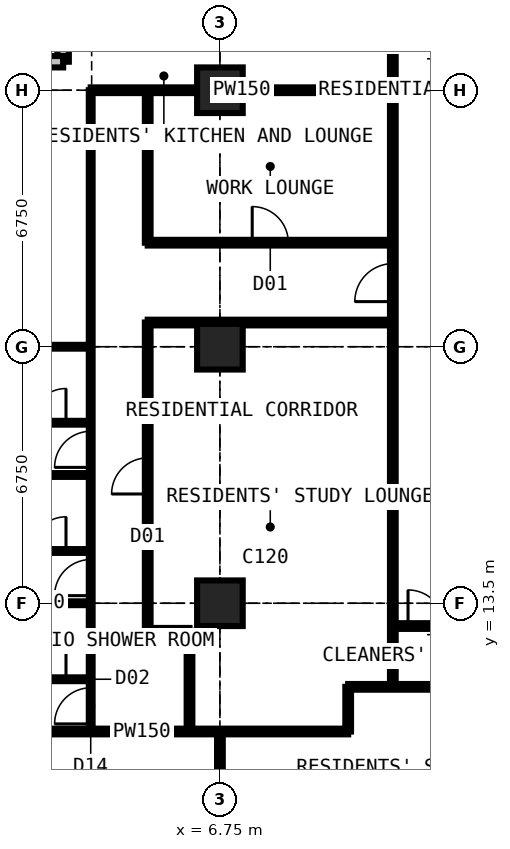
"""IFC4 building model, lengths in metres.
Left out: names, types, materials, properties, quantities, classifications, styles, units other than length and angle.
Written with IfcOpenShell. Run it as: python <this file> out.ifc"""

import sys

from ifc_helpers import new_model, si_unit, direction, frame, frame_2d, origin, origin_2d, place, context, subcontext, project, spatial, rectangle, extrude, element, fill, save


model = new_model("IFC4")
c1 = context("Model", 3, precision=1e-05, world=origin(), true_north=direction((0.0, 1.0)))
c2 = subcontext(c1, "Body", "Model", "MODEL_VIEW")
j1 = project(units=[si_unit("LENGTHUNIT", "METRE"), si_unit("PLANEANGLEUNIT", "RADIAN")], contexts=[c1])
p1 = place(None, origin())
s1 = spatial("IfcSite", under=j1, at=p1, CompositionType="ELEMENT")
p2 = place(p1, origin())
s2 = spatial("IfcBuilding", under=s1, at=p2, CompositionType="ELEMENT")
p3 = place(p2, frame((0.0, 0.0, 192.6)))
s3 = spatial("IfcBuildingStorey", under=s2, at=p3, CompositionType="ELEMENT", Elevation=192.6)
for number, where, z_axis, x_axis in (
    (1, (6.75, 13.5, 0.0), (0.0, 0.0, 1.0), (1.0, 0.0, 0.0)),
    (2, (6.75, 20.25, 0.0), (0.0, 0.0, 1.0), (1.0, 0.0, 0.0)),
    (3, (6.75, 27.0, 0.0), (0.0, 0.0, 1.0), (1.0, 0.0, 0.0)),
):
    element("IfcColumn", number, at=place(p3, frame(where, z_axis=z_axis, x_axis=x_axis)), inside=s3, PredefinedType="COLUMN", context=c2, shape_type="SweptSolid", body=[
        extrude(rectangle(XDim=1.2, YDim=1.2, at=origin_2d()), origin(), (0.0, 0.0, 1.0), 3.6),
    ])
p4 = place(p3, frame((2.625, 31.125, 0.0), z_axis=(0.0, 0.0, 1.0), x_axis=(0.0, -1.0, 0.0)))
e4 = element("IfcWall", 4, at=p4, inside=s3, PredefinedType="SOLIDWALL", context=c2, shape_type="SweptSolid", body=[
    extrude(rectangle(XDim=3.375, YDim=0.3, at=frame_2d((1.688, 0.0))), origin(), (0.0, 0.0, 1.0), 3.375),
])
p5 = place(p4, frame((0.788, 0.0, 0.6)))
e5 = element("IfcOpeningElement", 5, at=p5, cuts=e4, PredefinedType="OPENING", context=c2, shape_type="SweptSolid", body=[
    extrude(rectangle(XDim=1.8, YDim=2.1, at=frame_2d((0.9, 1.05))), frame((0.0, 0.16, 0.0), z_axis=(0.0, -1.0, 0.0), x_axis=(1.0, 0.0, 0.0)), (0.0, 0.0, 1.0), 0.32),
])
p6 = place(p3, frame((2.625, 27.75, 0.0), z_axis=(0.0, 0.0, 1.0), x_axis=(-1.0, 0.0, 0.0)))
e6 = element("IfcWall", 6, at=p6, inside=s3, PredefinedType="SOLIDWALL", context=c2, shape_type="SweptSolid", body=[
    extrude(rectangle(XDim=3.375, YDim=0.3, at=frame_2d((1.688, 0.0))), origin(), (0.0, 0.0, 1.0), 3.375),
])
p7 = place(p6, frame((0.788, 0.0, 0.6)))
e7 = element("IfcOpeningElement", 7, at=p7, cuts=e6, PredefinedType="OPENING", context=c2, shape_type="SweptSolid", body=[
    extrude(rectangle(XDim=1.8, YDim=2.1, at=frame_2d((0.9, 1.05))), frame((0.0, 0.16, 0.0), z_axis=(0.0, -1.0, 0.0), x_axis=(1.0, 0.0, 0.0)), (0.0, 0.0, 1.0), 0.32),
])
p8 = place(p3, frame((-0.734, 10.125, 0.0), z_axis=(0.0, 0.0, 1.0), x_axis=(1.0, 0.0, 0.0)))
e8 = element("IfcWall", 8, at=p8, inside=s3, PredefinedType="PARTITIONING", context=c2, shape_type="SweptSolid", body=[
    extrude(rectangle(XDim=10.859, YDim=0.15, at=frame_2d((5.429, 0.0))), origin(), (0.0, 0.0, 1.0), 3.375),
])
p9 = place(p3, frame((-0.734, 13.5, 0.0), z_axis=(0.0, 0.0, 1.0), x_axis=(1.0, 0.0, 0.0)))
e9 = element("IfcWall", 9, at=p9, inside=s3, PredefinedType="PARTITIONING", context=c2, shape_type="SweptSolid", body=[
    extrude(rectangle(XDim=4.084, YDim=0.1, at=frame_2d((2.042, 0.0))), origin(), (0.0, 0.0, 1.0), 2.877),
])
p10 = place(p3, frame((-0.734, 16.875, 0.0), z_axis=(0.0, 0.0, 1.0), x_axis=(1.0, 0.0, 0.0)))
e10 = element("IfcWall", 10, at=p10, inside=s3, PredefinedType="PARTITIONING", context=c2, shape_type="SweptSolid", body=[
    extrude(rectangle(XDim=4.084, YDim=0.1, at=frame_2d((2.042, 0.0))), origin(), (0.0, 0.0, 1.0), 3.375),
])
p11 = place(p3, frame((-0.734, 20.25, 0.0), z_axis=(0.0, 0.0, 1.0), x_axis=(1.0, 0.0, 0.0)))
e11 = element("IfcWall", 11, at=p11, inside=s3, PredefinedType="PARTITIONING", context=c2, shape_type="SweptSolid", body=[
    extrude(rectangle(XDim=4.084, YDim=0.1, at=frame_2d((2.042, 0.0))), origin(), (0.0, 0.0, 1.0), 2.877),
])
p12 = place(p3, frame((1.15, 11.5, 0.0), z_axis=(0.0, 0.0, 1.0), x_axis=(1.0, 0.0, 0.0)))
e12 = element("IfcWall", 12, at=p12, inside=s3, PredefinedType="PARTITIONING", context=c2, shape_type="SweptSolid", body=[
    extrude(rectangle(XDim=2.2, YDim=0.1, at=frame_2d((1.1, 0.0))), origin(), (0.0, 0.0, 1.0), 3.375),
])
p13 = place(p12, frame((0.65, 0.0, 0.0)))
e13 = element("IfcOpeningElement", 13, at=p13, cuts=e12, PredefinedType="OPENING", context=c2, shape_type="SweptSolid", body=[
    extrude(rectangle(XDim=0.9, YDim=2.2, at=frame_2d((0.45, 1.1))), frame((0.0, 0.06, 0.0), z_axis=(0.0, -1.0, 0.0), x_axis=(1.0, 0.0, 0.0)), (0.0, 0.0, 1.0), 0.12),
])
p14 = place(p3, frame((1.15, 14.875, 0.0), z_axis=(0.0, 0.0, 1.0), x_axis=(1.0, 0.0, 0.0)))
e14 = element("IfcWall", 14, at=p14, inside=s3, PredefinedType="PARTITIONING", context=c2, shape_type="SweptSolid", body=[
    extrude(rectangle(XDim=2.2, YDim=0.1, at=frame_2d((1.1, 0.0))), origin(), (0.0, 0.0, 1.0), 3.375),
])
p15 = place(p14, frame((0.65, 0.0, 0.0)))
e15 = element("IfcOpeningElement", 15, at=p15, cuts=e14, PredefinedType="OPENING", context=c2, shape_type="SweptSolid", body=[
    extrude(rectangle(XDim=0.9, YDim=2.2, at=frame_2d((0.45, 1.1))), frame((0.0, 0.06, 0.0), z_axis=(0.0, -1.0, 0.0), x_axis=(1.0, 0.0, 0.0)), (0.0, 0.0, 1.0), 0.12),
])
p16 = place(p3, frame((1.15, 18.25, 0.0), z_axis=(0.0, 0.0, 1.0), x_axis=(1.0, 0.0, 0.0)))
e16 = element("IfcWall", 16, at=p16, inside=s3, PredefinedType="PARTITIONING", context=c2, shape_type="SweptSolid", body=[
    extrude(rectangle(XDim=2.2, YDim=0.1, at=frame_2d((1.1, 0.0))), origin(), (0.0, 0.0, 1.0), 3.375),
])
p17 = place(p16, frame((0.65, 0.0, 0.0)))
e17 = element("IfcOpeningElement", 17, at=p17, cuts=e16, PredefinedType="OPENING", context=c2, shape_type="SweptSolid", body=[
    extrude(rectangle(XDim=0.9, YDim=2.2, at=frame_2d((0.45, 1.1))), frame((0.0, 0.06, 0.0), z_axis=(0.0, -1.0, 0.0), x_axis=(1.0, 0.0, 0.0)), (0.0, 0.0, 1.0), 0.12),
])
p18 = place(p3, frame((3.35, 10.125, 0.0), z_axis=(0.0, 0.0, 1.0), x_axis=(0.0, 1.0, 0.0)))
e18 = element("IfcWall", 18, at=p18, inside=s3, PredefinedType="PARTITIONING", context=c2, shape_type="SweptSolid", body=[
    extrude(rectangle(XDim=16.875, YDim=0.1, at=frame_2d((8.438, 0.0))), origin(), (0.0, 0.0, 1.0), 3.375),
])
p19 = place(p18, frame((0.2, 0.0, 0.0)))
e19 = element("IfcOpeningElement", 19, at=p19, cuts=e18, PredefinedType="OPENING", context=c2, shape_type="SweptSolid", body=[
    extrude(rectangle(XDim=0.95, YDim=2.2, at=frame_2d((0.475, 1.1))), frame((0.0, 0.06, 0.0), z_axis=(0.0, -1.0, 0.0), x_axis=(1.0, 0.0, 0.0)), (0.0, 0.0, 1.0), 0.12),
])
p20 = place(p18, frame((3.575, 0.0, 0.0)))
e20 = element("IfcOpeningElement", 20, at=p20, cuts=e18, PredefinedType="OPENING", context=c2, shape_type="SweptSolid", body=[
    extrude(rectangle(XDim=0.95, YDim=2.2, at=frame_2d((0.475, 1.1))), frame((0.0, 0.06, 0.0), z_axis=(0.0, -1.0, 0.0), x_axis=(1.0, 0.0, 0.0)), (0.0, 0.0, 1.0), 0.12),
])
p21 = place(p18, frame((6.95, 0.0, 0.0)))
e21 = element("IfcOpeningElement", 21, at=p21, cuts=e18, PredefinedType="OPENING", context=c2, shape_type="SweptSolid", body=[
    extrude(rectangle(XDim=0.95, YDim=2.2, at=frame_2d((0.475, 1.1))), frame((0.0, 0.06, 0.0), z_axis=(0.0, -1.0, 0.0), x_axis=(1.0, 0.0, 0.0)), (0.0, 0.0, 1.0), 0.12),
])
p22 = place(p3, frame((3.35, 27.0, 0.0), z_axis=(0.0, 0.0, 1.0), x_axis=(1.0, 0.0, 0.0)))
e22 = element("IfcWall", 22, at=p22, inside=s3, PredefinedType="PARTITIONING", context=c2, shape_type="SweptSolid", body=[
    extrude(rectangle(XDim=7.95, YDim=0.15, at=frame_2d((3.975, 0.0))), origin(), (0.0, 0.0, 1.0), 2.806),
])
p23 = place(p3, frame((4.85, 12.775, 0.0), z_axis=(0.0, 0.0, 1.0), x_axis=(0.0, 1.0, 0.0)))
e23 = element("IfcWall", 23, at=p23, inside=s3, PredefinedType="PARTITIONING", context=c2, shape_type="SweptSolid", body=[
    extrude(rectangle(XDim=8.113, YDim=0.15, at=frame_2d((4.056, 0.0))), origin(), (0.0, 0.0, 1.0), 3.375),
])
p24 = place(p23, frame((3.6, 0.0, 0.0)))
e24 = element("IfcOpeningElement", 24, at=p24, cuts=e23, PredefinedType="OPENING", context=c2, shape_type="SweptSolid", body=[
    extrude(rectangle(XDim=0.95, YDim=2.2, at=frame_2d((0.475, 1.1))), frame((0.0, 0.085, 0.0), z_axis=(0.0, -1.0, 0.0), x_axis=(1.0, 0.0, 0.0)), (0.0, 0.0, 1.0), 0.17),
])
p25 = place(p3, frame((4.85, 12.775, 0.0), z_axis=(0.0, 0.0, 1.0), x_axis=(1.0, 0.0, 0.0)))
e25 = element("IfcWall", 25, at=p25, inside=s3, PredefinedType="PARTITIONING", context=c2, shape_type="SweptSolid", body=[
    extrude(rectangle(XDim=1.1, YDim=0.15, at=frame_2d((0.55, 0.0))), origin(), (0.0, 0.0, 1.0), 3.375),
])
p26 = place(p3, frame((4.85, 20.887, 0.0), z_axis=(0.0, 0.0, 1.0), x_axis=(1.0, 0.0, 0.0)))
e26 = element("IfcWall", 26, at=p26, inside=s3, PredefinedType="PARTITIONING", context=c2, shape_type="SweptSolid", body=[
    extrude(rectangle(XDim=6.45, YDim=0.15, at=frame_2d((3.225, 0.0))), origin(), (0.0, 0.0, 1.0), 3.375),
])
p27 = place(p3, frame((4.85, 22.988, 0.0), z_axis=(0.0, 0.0, 1.0), x_axis=(0.0, 1.0, 0.0)))
e27 = element("IfcWall", 27, at=p27, inside=s3, PredefinedType="PARTITIONING", context=c2, shape_type="SweptSolid", body=[
    extrude(rectangle(XDim=4.012, YDim=0.15, at=frame_2d((2.006, 0.0))), origin(), (0.0, 0.0, 1.0), 3.375),
])
p28 = place(p3, frame((4.85, 22.988, 0.0), z_axis=(0.0, 0.0, 1.0), x_axis=(1.0, 0.0, 0.0)))
e28 = element("IfcWall", 28, at=p28, inside=s3, PredefinedType="PARTITIONING", context=c2, shape_type="SweptSolid", body=[
    extrude(rectangle(XDim=6.45, YDim=0.15, at=frame_2d((3.225, 0.0))), origin(), (0.0, 0.0, 1.0), 3.375),
])
p29 = place(p28, frame((2.75, 0.0, 0.0)))
e29 = element("IfcOpeningElement", 29, at=p29, cuts=e28, PredefinedType="OPENING", context=c2, shape_type="SweptSolid", body=[
    extrude(rectangle(XDim=0.95, YDim=2.2, at=frame_2d((0.475, 1.1))), frame((0.0, 0.085, 0.0), z_axis=(0.0, -1.0, 0.0), x_axis=(1.0, 0.0, 0.0)), (0.0, 0.0, 1.0), 0.17),
])
p30 = place(p3, frame((5.95, 10.125, 0.0), z_axis=(0.0, 0.0, 1.0), x_axis=(0.0, 1.0, 0.0)))
e30 = element("IfcWall", 30, at=p30, inside=s3, PredefinedType="PARTITIONING", context=c2, shape_type="SweptSolid", body=[
    extrude(rectangle(XDim=2.65, YDim=0.15, at=frame_2d((1.325, 0.0))), origin(), (0.0, 0.0, 1.0), 3.375),
])
p31 = place(p3, frame((6.75, 3.35, 0.0), z_axis=(0.0, 0.0, 1.0), x_axis=(0.0, 1.0, 0.0)))
e31 = element("IfcWall", 31, at=p31, inside=s3, PredefinedType="PARTITIONING", context=c2, shape_type="SweptSolid", body=[
    extrude(rectangle(XDim=6.775, YDim=0.15, at=frame_2d((3.387, 0.0))), origin(), (0.0, 0.0, 1.0), 2.877),
])
p32 = place(p3, frame((10.125, 10.125, 0.0), z_axis=(0.0, 0.0, 1.0), x_axis=(0.0, 1.0, 0.0)))
e32 = element("IfcWall", 32, at=p32, inside=s3, PredefinedType="PARTITIONING", context=c2, shape_type="SweptSolid", body=[
    extrude(rectangle(XDim=1.175, YDim=0.15, at=frame_2d((0.587, 0.0))), origin(), (0.0, 0.0, 1.0), 3.375),
])
p33 = place(p3, frame((10.125, 11.3, 0.0), z_axis=(0.0, 0.0, 1.0), x_axis=(1.0, 0.0, 0.0)))
e33 = element("IfcWall", 33, at=p33, inside=s3, PredefinedType="PARTITIONING", context=c2, shape_type="SweptSolid", body=[
    extrude(rectangle(XDim=20.25, YDim=0.15, at=frame_2d((10.125, 0.0))), origin(), (0.0, 0.0, 1.0), 3.375),
])
p34 = place(p33, frame((8.375, 0.0, 0.0)))
e34 = element("IfcOpeningElement", 34, at=p34, cuts=e33, PredefinedType="OPENING", context=c2, shape_type="SweptSolid", body=[
    extrude(rectangle(XDim=1.0, YDim=2.2, at=frame_2d((0.5, 1.1))), frame((0.0, 0.085, 0.0), z_axis=(0.0, -1.0, 0.0), x_axis=(1.0, 0.0, 0.0)), (0.0, 0.0, 1.0), 0.17),
])
p35 = place(p33, frame((10.975, 0.0, 0.0)))
e35 = element("IfcOpeningElement", 35, at=p35, cuts=e33, PredefinedType="OPENING", context=c2, shape_type="SweptSolid", body=[
    extrude(rectangle(XDim=1.0, YDim=2.2, at=frame_2d((0.5, 1.1))), frame((0.0, 0.085, 0.0), z_axis=(0.0, -1.0, 0.0), x_axis=(1.0, 0.0, 0.0)), (0.0, 0.0, 1.0), 0.17),
])
p36 = place(p33, frame((4.875, 0.0, 0.0)))
e36 = element("IfcOpeningElement", 36, at=p36, cuts=e33, PredefinedType="OPENING", context=c2, shape_type="SweptSolid", body=[
    extrude(rectangle(XDim=0.95, YDim=2.2, at=frame_2d((0.475, 1.1))), frame((0.0, 0.085, 0.0), z_axis=(0.0, -1.0, 0.0), x_axis=(1.0, 0.0, 0.0)), (0.0, 0.0, 1.0), 0.17),
])
p37 = place(p3, frame((11.3, 11.3, 0.0), z_axis=(0.0, 0.0, 1.0), x_axis=(0.0, 1.0, 0.0)))
e37 = element("IfcWall", 37, at=p37, inside=s3, PredefinedType="PARTITIONING", context=c2, shape_type="SweptSolid", body=[
    extrude(rectangle(XDim=19.3, YDim=0.15, at=frame_2d((9.65, 0.0))), origin(), (0.0, 0.0, 1.0), 3.375),
])
p38 = place(p37, frame((18.1, 0.0, 0.0)))
e38 = element("IfcOpeningElement", 38, at=p38, cuts=e37, PredefinedType="OPENING", context=c2, shape_type="SweptSolid", body=[
    extrude(rectangle(XDim=1.0, YDim=2.2, at=frame_2d((0.5, 1.1))), frame((0.0, 0.085, 0.0), z_axis=(0.0, -1.0, 0.0), x_axis=(1.0, 0.0, 0.0)), (0.0, 0.0, 1.0), 0.17),
])
p39 = place(p37, frame((10.137, 0.0, 0.0)))
e39 = element("IfcOpeningElement", 39, at=p39, cuts=e37, PredefinedType="OPENING", context=c2, shape_type="SweptSolid", body=[
    extrude(rectangle(XDim=1.0, YDim=2.2, at=frame_2d((0.5, 1.1))), frame((0.0, 0.085, 0.0), z_axis=(0.0, -1.0, 0.0), x_axis=(1.0, 0.0, 0.0)), (0.0, 0.0, 1.0), 0.17),
])
p40 = place(p3, frame((11.3, 12.9, 0.0), z_axis=(0.0, 0.0, 1.0), x_axis=(1.0, 0.0, 0.0)))
e40 = element("IfcWall", 40, at=p40, inside=s3, PredefinedType="PARTITIONING", context=c2, shape_type="SweptSolid", body=[
    extrude(rectangle(XDim=1.8, YDim=0.15, at=frame_2d((0.9, 0.0))), origin(), (0.0, 0.0, 1.0), 2.806),
])
p41 = place(p40, frame((0.4, 0.0, 0.0)))
e41 = element("IfcOpeningElement", 41, at=p41, cuts=e40, PredefinedType="OPENING", context=c2, shape_type="SweptSolid", body=[
    extrude(rectangle(XDim=0.95, YDim=2.2, at=frame_2d((0.475, 1.1))), frame((0.0, 0.085, 0.0), z_axis=(0.0, -1.0, 0.0), x_axis=(1.0, 0.0, 0.0)), (0.0, 0.0, 1.0), 0.17),
])
p42 = place(p41, origin())
e42 = element("IfcDoor", 42, at=p42, inside=s3, OperationType="SINGLE_SWING_LEFT", PredefinedType="DOOR", context=c2, shape_type="SweptSolid", body=[
    extrude(rectangle(XDim=0.95, YDim=2.2, at=frame_2d((0.475, 1.1))), frame((0.0, 0.025, 0.0), z_axis=(0.0, -1.0, 0.0), x_axis=(1.0, 0.0, 0.0)), (0.0, 0.0, 1.0), 0.05),
])
fill(e41, e42)
p43 = place(p19, origin())
e43 = element("IfcDoor", 43, at=p43, inside=s3, OperationType="SINGLE_SWING_LEFT", PredefinedType="DOOR", context=c2, shape_type="SweptSolid", body=[
    extrude(rectangle(XDim=0.95, YDim=2.2, at=frame_2d((0.475, 1.1))), frame((0.0, 0.025, 0.0), z_axis=(0.0, -1.0, 0.0), x_axis=(1.0, 0.0, 0.0)), (0.0, 0.0, 1.0), 0.05),
])
fill(e19, e43)
p44 = place(p13, origin())
e44 = element("IfcDoor", 44, at=p44, inside=s3, OperationType="SINGLE_SWING_RIGHT", PredefinedType="DOOR", context=c2, shape_type="SweptSolid", body=[
    extrude(rectangle(XDim=0.9, YDim=2.2, at=frame_2d((0.45, 1.1))), frame((0.0, 0.025, 0.0), z_axis=(0.0, -1.0, 0.0), x_axis=(1.0, 0.0, 0.0)), (0.0, 0.0, 1.0), 0.05),
])
fill(e13, e44)
p45 = place(p20, origin())
e45 = element("IfcDoor", 45, at=p45, inside=s3, OperationType="SINGLE_SWING_LEFT", PredefinedType="DOOR", context=c2, shape_type="SweptSolid", body=[
    extrude(rectangle(XDim=0.95, YDim=2.2, at=frame_2d((0.475, 1.1))), frame((0.0, 0.025, 0.0), z_axis=(0.0, -1.0, 0.0), x_axis=(1.0, 0.0, 0.0)), (0.0, 0.0, 1.0), 0.05),
])
fill(e20, e45)
p46 = place(p15, origin())
e46 = element("IfcDoor", 46, at=p46, inside=s3, OperationType="SINGLE_SWING_RIGHT", PredefinedType="DOOR", context=c2, shape_type="SweptSolid", body=[
    extrude(rectangle(XDim=0.9, YDim=2.2, at=frame_2d((0.45, 1.1))), frame((0.0, 0.025, 0.0), z_axis=(0.0, -1.0, 0.0), x_axis=(1.0, 0.0, 0.0)), (0.0, 0.0, 1.0), 0.05),
])
fill(e15, e46)
p47 = place(p21, origin())
e47 = element("IfcDoor", 47, at=p47, inside=s3, OperationType="SINGLE_SWING_LEFT", PredefinedType="DOOR", context=c2, shape_type="SweptSolid", body=[
    extrude(rectangle(XDim=0.95, YDim=2.2, at=frame_2d((0.475, 1.1))), frame((0.0, 0.025, 0.0), z_axis=(0.0, -1.0, 0.0), x_axis=(1.0, 0.0, 0.0)), (0.0, 0.0, 1.0), 0.05),
])
fill(e21, e47)
p48 = place(p17, origin())
e48 = element("IfcDoor", 48, at=p48, inside=s3, OperationType="SINGLE_SWING_RIGHT", PredefinedType="DOOR", context=c2, shape_type="SweptSolid", body=[
    extrude(rectangle(XDim=0.9, YDim=2.2, at=frame_2d((0.45, 1.1))), frame((0.0, 0.025, 0.0), z_axis=(0.0, -1.0, 0.0), x_axis=(1.0, 0.0, 0.0)), (0.0, 0.0, 1.0), 0.05),
])
fill(e17, e48)
p49 = place(p39, origin())
e49 = element("IfcDoor", 49, at=p49, inside=s3, OperationType="SINGLE_SWING_LEFT", PredefinedType="DOOR", context=c2, shape_type="SweptSolid", body=[
    extrude(rectangle(XDim=1.0, YDim=2.2, at=frame_2d((0.5, 1.1))), frame((0.0, 0.025, 0.0), z_axis=(0.0, -1.0, 0.0), x_axis=(1.0, 0.0, 0.0)), (0.0, 0.0, 1.0), 0.05),
])
fill(e39, e49)
p50 = place(p24, origin())
e50 = element("IfcDoor", 50, at=p50, inside=s3, OperationType="SINGLE_SWING_LEFT", PredefinedType="DOOR", context=c2, shape_type="SweptSolid", body=[
    extrude(rectangle(XDim=0.95, YDim=2.2, at=frame_2d((0.475, 1.1))), frame((0.0, 0.025, 0.0), z_axis=(0.0, -1.0, 0.0), x_axis=(1.0, 0.0, 0.0)), (0.0, 0.0, 1.0), 0.05),
])
fill(e24, e50)
p51 = place(p29, origin())
e51 = element("IfcDoor", 51, at=p51, inside=s3, OperationType="SINGLE_SWING_LEFT", PredefinedType="DOOR", context=c2, shape_type="SweptSolid", body=[
    extrude(rectangle(XDim=0.95, YDim=2.2, at=frame_2d((0.475, 1.1))), frame((0.0, 0.025, 0.0), z_axis=(0.0, -1.0, 0.0), x_axis=(1.0, 0.0, 0.0)), (0.0, 0.0, 1.0), 0.05),
])
fill(e29, e51)
save(model, sys.argv[1])
